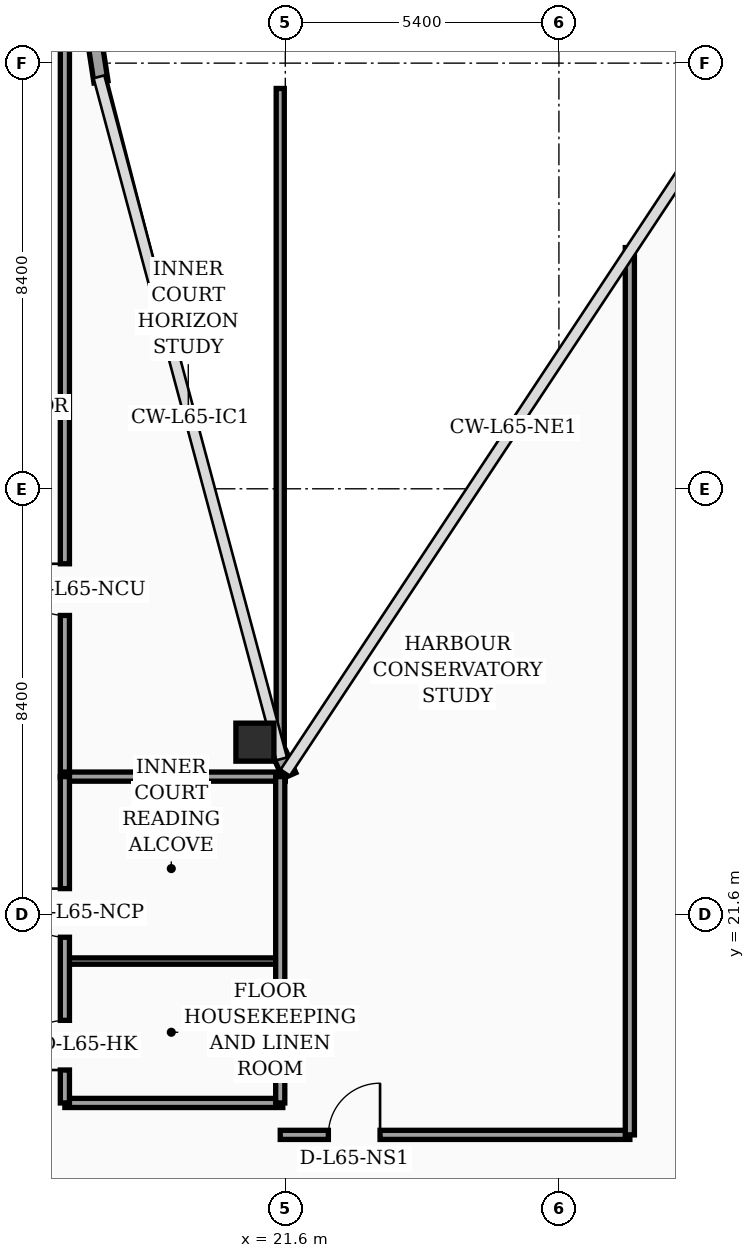
"""IFC4 building model, lengths in metres.
Left out: names, types, materials, properties, quantities, classifications, styles, units other than length and angle.
Written with IfcOpenShell. Run it as: python <this file> out.ifc"""

import sys

from ifc_helpers import new_model, si_unit, direction, frame, frame_2d, origin, origin_2d, place, context, subcontext, project, spatial, rectangle, hollow_rectangle, extrude, element, fill, save


model = new_model("IFC4")
c1 = context("Model", 3, precision=1e-05, world=origin(), true_north=direction((0.0, 1.0)))
c2 = subcontext(c1, "Body", "Model", "MODEL_VIEW")
j1 = project(units=[si_unit("LENGTHUNIT", "METRE"), si_unit("PLANEANGLEUNIT", "RADIAN")], contexts=[c1])
p1 = place(None, origin())
s1 = spatial("IfcSite", under=j1, at=p1, CompositionType="ELEMENT")
p2 = place(p1, origin())
s2 = spatial("IfcBuilding", under=s1, at=p2, CompositionType="ELEMENT")
p3 = place(p2, frame((0.0, 0.0, 263.5)))
s3 = spatial("IfcBuildingStorey", under=s2, at=p3, CompositionType="ELEMENT", Elevation=263.5)
p4 = place(p3, frame((21.0, 25.0, 0.0), z_axis=(0.0, 0.0, 1.0), x_axis=(1.0, 0.0, 0.0)))
e1 = element("IfcColumn", 1, at=p4, inside=s3, PredefinedType="COLUMN", context=c2, shape_type="SweptSolid", body=[
    extrude(hollow_rectangle(XDim=0.75, YDim=0.75, WallThickness=0.032, at=origin_2d()), origin(), (0.0, 0.0, 1.0), 3.56),
])
p5 = place(p3, frame((21.68, 24.34, 0.0), z_axis=(0.0, 0.0, 1.0), x_axis=(-0.40758134973, 0.913168901875, 0.0)))
e2 = element("IfcWall", 2, at=p5, inside=s3, PredefinedType="SOLIDWALL", context=c2, shape_type="SweptSolid", body=[
    extrude(rectangle(XDim=0.471, YDim=0.28, at=frame_2d((0.235, 0.0))), origin(), (0.0, 0.0, 1.0), 3.56),
])
p6 = place(p3, frame((17.962, 38.03, 0.0), z_axis=(0.0, 0.0, 1.0), x_axis=(-0.15141125477, 0.988470855377, 0.0)))
e3 = element("IfcWall", 3, at=p6, inside=s3, PredefinedType="SOLIDWALL", context=c2, shape_type="SweptSolid", body=[
    extrude(rectangle(XDim=0.739, YDim=0.28, at=frame_2d((0.369, 0.0))), origin(), (0.0, 0.0, 1.0), 3.56),
])
p7 = place(p3, frame((17.25, 24.3, 0.0), z_axis=(0.0, 0.0, 1.0), x_axis=(0.0, 1.0, 0.0)))
e4 = element("IfcWall", 4, at=p7, inside=s3, PredefinedType="PARTITIONING", context=c2, shape_type="SweptSolid", body=[
    extrude(rectangle(XDim=18.15, YDim=0.18, at=frame_2d((9.075, 0.0))), origin(), (0.0, 0.0, 1.0), 2.99),
])
p8 = place(p7, frame((3.2, 0.0, 0.0)))
e5 = element("IfcOpeningElement", 5, at=p8, cuts=e4, PredefinedType="OPENING", context=c2, shape_type="SweptSolid", body=[
    extrude(rectangle(XDim=1.02, YDim=2.2, at=frame_2d((0.51, 1.1))), frame((0.0, 0.1, 0.0), z_axis=(0.0, -1.0, 0.0), x_axis=(1.0, 0.0, 0.0)), (0.0, 0.0, 1.0), 0.2),
])
p9 = place(p3, frame((17.25, 17.88, 0.0), z_axis=(0.0, 0.0, 1.0), x_axis=(1.0, 0.0, 0.0)))
e6 = element("IfcWall", 6, at=p9, inside=s3, PredefinedType="PARTITIONING", context=c2, shape_type="SweptSolid", body=[
    extrude(rectangle(XDim=4.3, YDim=0.18, at=frame_2d((2.15, 0.0))), origin(), (0.0, 0.0, 1.0), 3.56),
])
p10 = place(p3, frame((17.25, 20.68, 0.0), z_axis=(0.0, 0.0, 1.0), x_axis=(1.0, 0.0, 0.0)))
e7 = element("IfcWall", 7, at=p10, inside=s3, PredefinedType="PARTITIONING", context=c2, shape_type="SweptSolid", body=[
    extrude(rectangle(XDim=4.3, YDim=0.125, at=frame_2d((2.15, 0.0))), origin(), (0.0, 0.0, 1.0), 3.56),
])
p11 = place(p3, frame((17.25, 24.32, 0.0), z_axis=(0.0, 0.0, 1.0), x_axis=(1.0, 0.0, 0.0)))
e8 = element("IfcWall", 8, at=p11, inside=s3, PredefinedType="PARTITIONING", context=c2, shape_type="SweptSolid", body=[
    extrude(rectangle(XDim=4.35, YDim=0.18, at=frame_2d((2.175, 0.0))), origin(), (0.0, 0.0, 1.0), 3.56),
])
p12 = place(p3, frame((21.5, 17.88, 0.0), z_axis=(0.0, 0.0, 1.0), x_axis=(0.0, 1.0, 0.0)))
e9 = element("IfcWall", 9, at=p12, inside=s3, PredefinedType="PARTITIONING", context=c2, shape_type="SweptSolid", body=[
    extrude(rectangle(XDim=6.44, YDim=0.18, at=frame_2d((3.22, 0.0))), origin(), (0.0, 0.0, 1.0), 3.56),
])
p13 = place(p3, frame((17.25, 17.88, 0.0), z_axis=(0.0, 0.0, 1.0), x_axis=(0.0, 1.0, 0.0)))
e10 = element("IfcWall", 10, at=p13, inside=s3, PredefinedType="PARTITIONING", context=c2, shape_type="SweptSolid", body=[
    extrude(rectangle(XDim=6.44, YDim=0.18, at=frame_2d((3.22, 0.0))), origin(), (0.0, 0.0, 1.0), 3.56),
])
p14 = place(p13, frame((0.65, 0.0, 0.0)))
e11 = element("IfcOpeningElement", 11, at=p14, cuts=e10, PredefinedType="OPENING", context=c2, shape_type="SweptSolid", body=[
    extrude(rectangle(XDim=0.98, YDim=2.15, at=frame_2d((0.49, 1.075))), frame((0.0, 0.1, 0.0), z_axis=(0.0, -1.0, 0.0), x_axis=(1.0, 0.0, 0.0)), (0.0, 0.0, 1.0), 0.2),
])
p15 = place(p13, frame((3.27, 0.0, 0.0)))
e12 = element("IfcOpeningElement", 12, at=p15, cuts=e10, PredefinedType="OPENING", context=c2, shape_type="SweptSolid", body=[
    extrude(rectangle(XDim=0.96, YDim=2.2, at=frame_2d((0.48, 1.1))), frame((0.0, 0.1, 0.0), z_axis=(0.0, -1.0, 0.0), x_axis=(1.0, 0.0, 0.0)), (0.0, 0.0, 1.0), 0.2),
])
p16 = place(p3, frame((21.5, 24.85, 0.0), z_axis=(0.0, 0.0, 1.0), x_axis=(0.0, 1.0, 0.0)))
e13 = element("IfcWall", 13, at=p16, inside=s3, PredefinedType="PARTITIONING", context=c2, shape_type="SweptSolid", body=[
    extrude(rectangle(XDim=13.05, YDim=0.16, at=frame_2d((6.525, 0.0))), origin(), (0.0, 0.0, 1.0), 2.99),
])
p17 = place(p3, frame((21.5, 17.25, 0.0), z_axis=(0.0, 0.0, 1.0), x_axis=(1.0, 0.0, 0.0)))
e14 = element("IfcWall", 14, at=p17, inside=s3, PredefinedType="PARTITIONING", context=c2, shape_type="SweptSolid", body=[
    extrude(rectangle(XDim=6.9, YDim=0.18, at=frame_2d((3.45, 0.0))), origin(), (0.0, 0.0, 1.0), 3.56),
])
p18 = place(p17, frame((0.95, 0.0, 0.0)))
e15 = element("IfcOpeningElement", 15, at=p18, cuts=e14, PredefinedType="OPENING", context=c2, shape_type="SweptSolid", body=[
    extrude(rectangle(XDim=1.02, YDim=2.2, at=frame_2d((0.51, 1.1))), frame((0.0, 0.1, 0.0), z_axis=(0.0, -1.0, 0.0), x_axis=(1.0, 0.0, 0.0)), (0.0, 0.0, 1.0), 0.2),
])
p19 = place(p3, frame((28.4, 17.25, 0.0), z_axis=(0.0, 0.0, 1.0), x_axis=(0.0, 1.0, 0.0)))
e16 = element("IfcWall", 16, at=p19, inside=s3, PredefinedType="PARTITIONING", context=c2, shape_type="SweptSolid", body=[
    extrude(rectangle(XDim=17.51, YDim=0.18, at=frame_2d((8.755, 0.0))), origin(), (0.0, 0.0, 1.0), 3.09),
])
p20 = place(p8, origin())
e17 = element("IfcDoor", 17, at=p20, inside=s3, OperationType="SINGLE_SWING_RIGHT", PredefinedType="DOOR", context=c2, shape_type="SweptSolid", body=[
    extrude(rectangle(XDim=1.02, YDim=2.2, at=frame_2d((0.51, 1.1))), frame((0.0, 0.025, 0.0), z_axis=(0.0, -1.0, 0.0), x_axis=(1.0, 0.0, 0.0)), (0.0, 0.0, 1.0), 0.05),
])
fill(e5, e17)
p21 = place(p14, origin())
e18 = element("IfcDoor", 18, at=p21, inside=s3, OperationType="SINGLE_SWING_LEFT", PredefinedType="DOOR", context=c2, shape_type="SweptSolid", body=[
    extrude(rectangle(XDim=0.98, YDim=2.15, at=frame_2d((0.49, 1.075))), frame((0.0, 0.025, 0.0), z_axis=(0.0, -1.0, 0.0), x_axis=(1.0, 0.0, 0.0)), (0.0, 0.0, 1.0), 0.05),
])
fill(e11, e18)
p22 = place(p15, origin())
e19 = element("IfcDoor", 19, at=p22, inside=s3, OperationType="SINGLE_SWING_RIGHT", PredefinedType="DOOR", context=c2, shape_type="SweptSolid", body=[
    extrude(rectangle(XDim=0.96, YDim=2.2, at=frame_2d((0.48, 1.1))), frame((0.0, 0.025, 0.0), z_axis=(0.0, -1.0, 0.0), x_axis=(1.0, 0.0, 0.0)), (0.0, 0.0, 1.0), 0.05),
])
fill(e12, e19)
p23 = place(p18, origin())
e20 = element("IfcDoor", 20, at=p23, inside=s3, OperationType="SINGLE_SWING_RIGHT", PredefinedType="DOOR", context=c2, shape_type="SweptSolid", body=[
    extrude(rectangle(XDim=1.02, YDim=2.2, at=frame_2d((0.51, 1.1))), frame((0.0, 0.025, 0.0), z_axis=(0.0, -1.0, 0.0), x_axis=(1.0, 0.0, 0.0)), (0.0, 0.0, 1.0), 0.05),
])
fill(e15, e20)
save(model, sys.argv[1])
